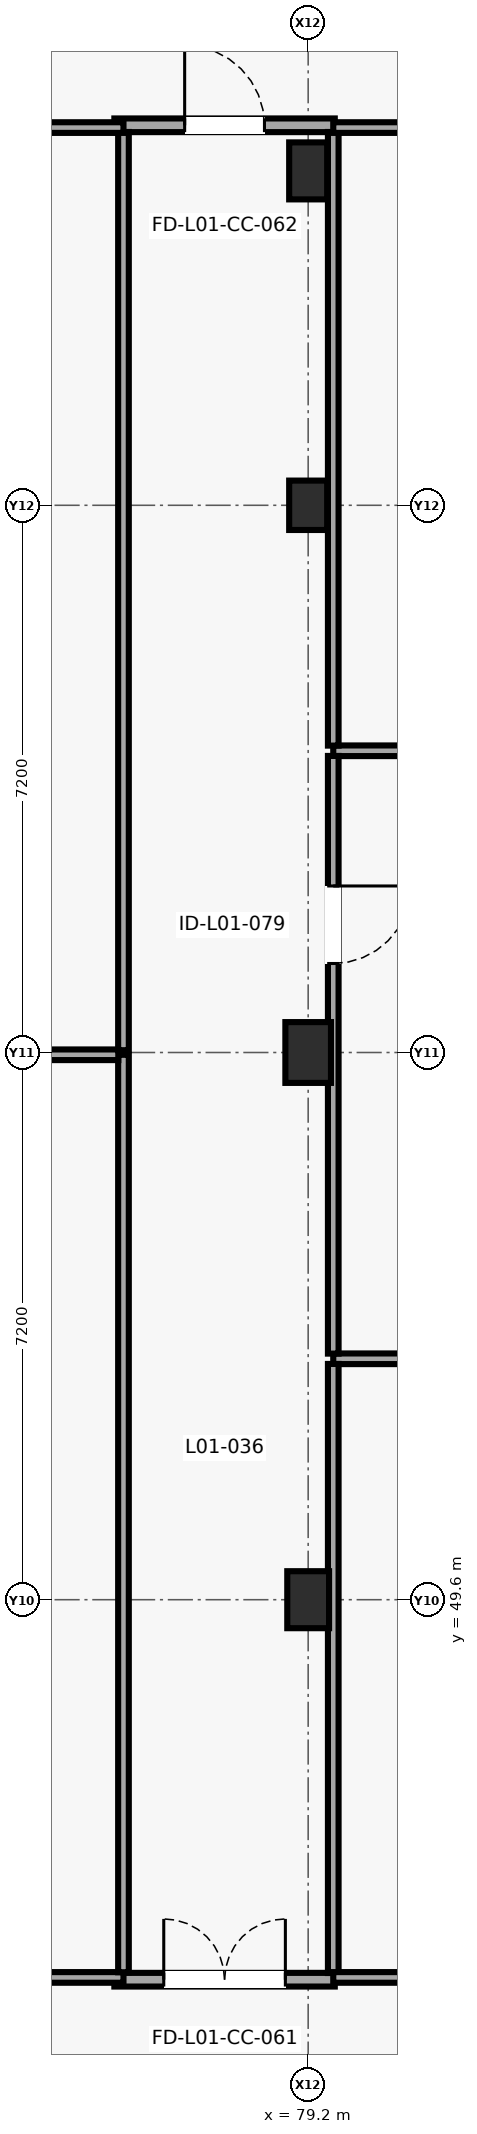
"""IFC4 building model, lengths in metres.
Left out: names, types, materials, properties, quantities, classifications, styles, units other than length and angle.
Written with IfcOpenShell. Run it as: python <this file> out.ifc"""

import sys

from ifc_helpers import new_model, si_unit, direction, frame, frame_2d, origin, origin_2d, place, context, subcontext, project, spatial, rectangle, extrude, element, fill, save


model = new_model("IFC4")
c1 = context("Model", 3, precision=1e-05, world=origin(), true_north=direction((0.0, 1.0)))
c2 = subcontext(c1, "Body", "Model", "MODEL_VIEW")
j1 = project(units=[si_unit("LENGTHUNIT", "METRE"), si_unit("PLANEANGLEUNIT", "RADIAN")], contexts=[c1])
p1 = place(None, origin())
s1 = spatial("IfcSite", under=j1, at=p1, CompositionType="ELEMENT")
p2 = place(p1, origin())
s2 = spatial("IfcBuilding", under=s1, at=p2, CompositionType="ELEMENT")
p3 = place(p2, frame((0.0, 0.0, 4.2)))
s3 = spatial("IfcBuildingStorey", under=s2, at=p3, CompositionType="ELEMENT", Elevation=4.2)
p4 = place(p3, frame((79.2, 49.6, 0.0), z_axis=(0.0, 0.0, 1.0), x_axis=(1.0, 0.0, 0.0)))
e1 = element("IfcColumn", 1, at=p4, inside=s3, PredefinedType="COLUMN", context=c2, shape_type="SweptSolid", body=[
    extrude(rectangle(XDim=0.55, YDim=0.75, at=origin_2d()), origin(), (0.0, 0.0, 1.0), 4.0),
])
p5 = place(p3, frame((79.2, 56.8, 0.0), z_axis=(0.0, 0.0, 1.0), x_axis=(1.0, 0.0, 0.0)))
e2 = element("IfcColumn", 2, at=p5, inside=s3, PredefinedType="COLUMN", context=c2, shape_type="SweptSolid", body=[
    extrude(rectangle(XDim=0.6, YDim=0.8, at=origin_2d()), origin(), (0.0, 0.0, 1.0), 4.0),
])
p6 = place(p3, frame((79.2, 64.0, 0.0), z_axis=(0.0, 0.0, 1.0), x_axis=(1.0, 0.0, 0.0)))
e3 = element("IfcColumn", 3, at=p6, inside=s3, PredefinedType="COLUMN", context=c2, shape_type="SweptSolid", body=[
    extrude(rectangle(XDim=0.5, YDim=0.65, at=origin_2d()), origin(), (0.0, 0.0, 1.0), 4.0),
])
p7 = place(p3, frame((79.2, 68.4, 0.0), z_axis=(0.0, 0.0, 1.0), x_axis=(1.0, 0.0, 0.0)))
e4 = element("IfcColumn", 4, at=p7, inside=s3, PredefinedType="COLUMN", context=c2, shape_type="SweptSolid", body=[
    extrude(rectangle(XDim=0.5, YDim=0.75, at=origin_2d()), origin(), (0.0, 0.0, 1.0), 4.0),
])
p8 = place(p3, frame((76.65, 44.6, 0.0), z_axis=(0.0, 0.0, 1.0), x_axis=(1.0, 0.0, 0.0)))
e5 = element("IfcWall", 5, at=p8, inside=s3, PredefinedType="PARTITIONING", context=c2, shape_type="SweptSolid", body=[
    extrude(rectangle(XDim=2.9, YDim=0.18, at=frame_2d((1.45, 0.0))), origin(), (0.0, 0.0, 1.0), 3.78),
])
p9 = place(p8, frame((0.65, 0.0, 0.0)))
e6 = element("IfcOpeningElement", 6, at=p9, cuts=e5, PredefinedType="OPENING", context=c2, shape_type="SweptSolid", body=[
    extrude(rectangle(XDim=1.6, YDim=2.25, at=frame_2d((0.8, 1.125))), frame((0.0, 0.1, 0.0), z_axis=(0.0, -1.0, 0.0), x_axis=(1.0, 0.0, 0.0)), (0.0, 0.0, 1.0), 0.2),
])
p10 = place(p3, frame((76.65, 69.0, 0.0), z_axis=(0.0, 0.0, 1.0), x_axis=(1.0, 0.0, 0.0)))
e7 = element("IfcWall", 7, at=p10, inside=s3, PredefinedType="PARTITIONING", context=c2, shape_type="SweptSolid", body=[
    extrude(rectangle(XDim=2.9, YDim=0.18, at=frame_2d((1.45, 0.0))), origin(), (0.0, 0.0, 1.0), 3.78),
])
p11 = place(p10, frame((0.925, 0.0, 0.0)))
e8 = element("IfcOpeningElement", 8, at=p11, cuts=e7, PredefinedType="OPENING", context=c2, shape_type="SweptSolid", body=[
    extrude(rectangle(XDim=1.05, YDim=2.15, at=frame_2d((0.525, 1.075))), frame((0.0, 0.1, 0.0), z_axis=(0.0, -1.0, 0.0), x_axis=(1.0, 0.0, 0.0)), (0.0, 0.0, 1.0), 0.2),
])
p12 = place(p3, frame((87.902, 52.77, 0.0), z_axis=(0.0, 0.0, 1.0), x_axis=(-1.0, 0.0, 0.0)))
e9 = element("IfcWall", 9, at=p12, inside=s3, PredefinedType="PARTITIONING", context=c2, shape_type="SweptSolid", body=[
    extrude(rectangle(XDim=8.372, YDim=0.14, at=frame_2d((4.186, 0.0))), origin(), (0.0, 0.0, 1.0), 3.775),
])
p13 = place(p3, frame((79.53, 52.702, 0.0), z_axis=(0.0, 0.0, 1.0), x_axis=(0.0, -1.0, 0.0)))
e10 = element("IfcWall", 10, at=p13, inside=s3, PredefinedType="PARTITIONING", context=c2, shape_type="SweptSolid", body=[
    extrude(rectangle(XDim=8.014, YDim=0.14, at=frame_2d((4.007, 0.0))), origin(), (0.0, 0.0, 1.0), 3.775),
])
p14 = place(p3, frame((79.53, 44.63, 0.0), z_axis=(0.0, 0.0, 1.0), x_axis=(1.0, 0.0, 0.0)))
e11 = element("IfcWall", 11, at=p14, inside=s3, PredefinedType="PARTITIONING", context=c2, shape_type="SweptSolid", body=[
    extrude(rectangle(XDim=8.372, YDim=0.14, at=frame_2d((4.186, 0.0))), origin(), (0.0, 0.0, 1.0), 3.775),
])
p15 = place(p14, frame((3.561, 0.0, 0.0)))
e12 = element("IfcOpeningElement", 12, at=p15, cuts=e11, PredefinedType="OPENING", context=c2, shape_type="SweptSolid", body=[
    extrude(rectangle(XDim=1.25, YDim=2.22, at=frame_2d((0.625, 1.11))), frame((0.0, 0.08, 0.0), z_axis=(0.0, -1.0, 0.0), x_axis=(1.0, 0.0, 0.0)), (0.0, 0.0, 1.0), 0.16),
])
p16 = place(p14, frame((5.511, 0.0, 1.05)))
e13 = element("IfcOpeningElement", 13, at=p16, cuts=e11, PredefinedType="OPENING", context=c2, shape_type="SweptSolid", body=[
    extrude(rectangle(XDim=1.8, YDim=1.2, at=frame_2d((0.9, 0.6))), frame((0.0, 0.08, 0.0), z_axis=(0.0, -1.0, 0.0), x_axis=(1.0, 0.0, 0.0)), (0.0, 0.0, 1.0), 0.16),
])
p17 = place(p3, frame((87.902, 60.77, 0.0), z_axis=(0.0, 0.0, 1.0), x_axis=(-1.0, 0.0, 0.0)))
e14 = element("IfcWall", 14, at=p17, inside=s3, PredefinedType="PARTITIONING", context=c2, shape_type="SweptSolid", body=[
    extrude(rectangle(XDim=8.372, YDim=0.14, at=frame_2d((4.186, 0.0))), origin(), (0.0, 0.0, 1.0), 3.775),
])
p18 = place(p3, frame((79.53, 60.702, 0.0), z_axis=(0.0, 0.0, 1.0), x_axis=(0.0, -1.0, 0.0)))
e15 = element("IfcWall", 15, at=p18, inside=s3, PredefinedType="PARTITIONING", context=c2, shape_type="SweptSolid", body=[
    extrude(rectangle(XDim=7.864, YDim=0.14, at=frame_2d((3.932, 0.0))), origin(), (0.0, 0.0, 1.0), 3.775),
])
p19 = place(p18, frame((1.711, 0.0, 0.0)))
e16 = element("IfcOpeningElement", 16, at=p19, cuts=e15, PredefinedType="OPENING", context=c2, shape_type="SweptSolid", body=[
    extrude(rectangle(XDim=1.02, YDim=2.14, at=frame_2d((0.51, 1.07))), frame((0.0, 0.08, 0.0), z_axis=(0.0, -1.0, 0.0), x_axis=(1.0, 0.0, 0.0)), (0.0, 0.0, 1.0), 0.16),
])
p20 = place(p3, frame((79.53, 68.912, 0.0), z_axis=(0.0, 0.0, 1.0), x_axis=(0.0, -1.0, 0.0)))
e17 = element("IfcWall", 17, at=p20, inside=s3, PredefinedType="PARTITIONING", context=c2, shape_type="SweptSolid", body=[
    extrude(rectangle(XDim=8.074, YDim=0.14, at=frame_2d((4.037, 0.0))), origin(), (0.0, 0.0, 1.0), 3.775),
])
p21 = place(p3, frame((87.902, 68.97, 0.0), z_axis=(0.0, 0.0, 1.0), x_axis=(-1.0, 0.0, 0.0)))
e18 = element("IfcWall", 18, at=p21, inside=s3, PredefinedType="PARTITIONING", context=c2, shape_type="SweptSolid", body=[
    extrude(rectangle(XDim=8.372, YDim=0.14, at=frame_2d((4.186, 0.0))), origin(), (0.0, 0.0, 1.0), 3.775),
])
p22 = place(p21, frame((3.646, 0.0, 0.0)))
e19 = element("IfcOpeningElement", 19, at=p22, cuts=e18, PredefinedType="OPENING", context=c2, shape_type="SweptSolid", body=[
    extrude(rectangle(XDim=1.08, YDim=2.16, at=frame_2d((0.54, 1.08))), frame((0.0, 0.08, 0.0), z_axis=(0.0, -1.0, 0.0), x_axis=(1.0, 0.0, 0.0)), (0.0, 0.0, 1.0), 0.16),
])
p23 = place(p21, frame((5.426, 0.0, 1.05)))
e20 = element("IfcOpeningElement", 20, at=p23, cuts=e18, PredefinedType="OPENING", context=c2, shape_type="SweptSolid", body=[
    extrude(rectangle(XDim=1.6, YDim=1.1, at=frame_2d((0.8, 0.55))), frame((0.0, 0.08, 0.0), z_axis=(0.0, -1.0, 0.0), x_axis=(1.0, 0.0, 0.0)), (0.0, 0.0, 1.0), 0.16),
])
p24 = place(p3, frame((63.43, 44.63, 0.0), z_axis=(0.0, 0.0, 1.0), x_axis=(1.0, 0.0, 0.0)))
e21 = element("IfcWall", 21, at=p24, inside=s3, PredefinedType="PARTITIONING", context=c2, shape_type="SweptSolid", body=[
    extrude(rectangle(XDim=13.34, YDim=0.14, at=frame_2d((6.67, 0.0))), origin(), (0.0, 0.0, 1.0), 3.775),
])
p25 = place(p24, frame((6.16, 0.0, 0.0)))
e22 = element("IfcOpeningElement", 22, at=p25, cuts=e21, PredefinedType="OPENING", context=c2, shape_type="SweptSolid", body=[
    extrude(rectangle(XDim=1.02, YDim=2.14, at=frame_2d((0.51, 1.07))), frame((0.0, 0.08, 0.0), z_axis=(0.0, -1.0, 0.0), x_axis=(1.0, 0.0, 0.0)), (0.0, 0.0, 1.0), 0.16),
])
p26 = place(p24, frame((7.88, 0.0, 1.05)))
e23 = element("IfcOpeningElement", 23, at=p26, cuts=e21, PredefinedType="OPENING", context=c2, shape_type="SweptSolid", body=[
    extrude(rectangle(XDim=1.6, YDim=1.1, at=frame_2d((0.8, 0.55))), frame((0.0, 0.08, 0.0), z_axis=(0.0, -1.0, 0.0), x_axis=(1.0, 0.0, 0.0)), (0.0, 0.0, 1.0), 0.16),
])
p27 = place(p3, frame((76.77, 44.698, 0.0), z_axis=(0.0, 0.0, 1.0), x_axis=(0.0, 1.0, 0.0)))
e24 = element("IfcWall", 24, at=p27, inside=s3, PredefinedType="PARTITIONING", context=c2, shape_type="SweptSolid", body=[
    extrude(rectangle(XDim=12.072, YDim=0.14, at=frame_2d((6.036, 0.0))), origin(), (0.0, 0.0, 1.0), 3.775),
])
p28 = place(p3, frame((76.702, 56.77, 0.0), z_axis=(0.0, 0.0, 1.0), x_axis=(-1.0, 0.0, 0.0)))
e25 = element("IfcWall", 25, at=p28, inside=s3, PredefinedType="PARTITIONING", context=c2, shape_type="SweptSolid", body=[
    extrude(rectangle(XDim=2.086, YDim=0.14, at=frame_2d((1.043, 0.0))), origin(), (0.0, 0.0, 1.0), 3.775),
])
p29 = place(p3, frame((76.77, 56.83, 0.0), z_axis=(0.0, 0.0, 1.0), x_axis=(0.0, 1.0, 0.0)))
e26 = element("IfcWall", 26, at=p29, inside=s3, PredefinedType="PARTITIONING", context=c2, shape_type="SweptSolid", body=[
    extrude(rectangle(XDim=12.082, YDim=0.14, at=frame_2d((6.041, 0.0))), origin(), (0.0, 0.0, 1.0), 3.775),
])
p30 = place(p3, frame((76.77, 68.97, 0.0), z_axis=(0.0, 0.0, 1.0), x_axis=(-1.0, 0.0, 0.0)))
e27 = element("IfcWall", 27, at=p30, inside=s3, PredefinedType="PARTITIONING", context=c2, shape_type="SweptSolid", body=[
    extrude(rectangle(XDim=13.34, YDim=0.14, at=frame_2d((6.67, 0.0))), origin(), (0.0, 0.0, 1.0), 3.775),
])
p31 = place(p30, frame((6.13, 0.0, 0.0)))
e28 = element("IfcOpeningElement", 28, at=p31, cuts=e27, PredefinedType="OPENING", context=c2, shape_type="SweptSolid", body=[
    extrude(rectangle(XDim=1.08, YDim=2.16, at=frame_2d((0.54, 1.08))), frame((0.0, 0.08, 0.0), z_axis=(0.0, -1.0, 0.0), x_axis=(1.0, 0.0, 0.0)), (0.0, 0.0, 1.0), 0.16),
])
p32 = place(p30, frame((7.91, 0.0, 1.05)))
e29 = element("IfcOpeningElement", 29, at=p32, cuts=e27, PredefinedType="OPENING", context=c2, shape_type="SweptSolid", body=[
    extrude(rectangle(XDim=1.8, YDim=1.2, at=frame_2d((0.9, 0.6))), frame((0.0, 0.08, 0.0), z_axis=(0.0, -1.0, 0.0), x_axis=(1.0, 0.0, 0.0)), (0.0, 0.0, 1.0), 0.16),
])
p33 = place(p9, origin())
e30 = element("IfcDoor", 30, at=p33, inside=s3, OperationType="DOUBLE_DOOR_SINGLE_SWING", PredefinedType="DOOR", context=c2, shape_type="SweptSolid", body=[
    extrude(rectangle(XDim=1.6, YDim=2.25, at=frame_2d((0.8, 1.125))), frame((0.0, 0.025, 0.0), z_axis=(0.0, -1.0, 0.0), x_axis=(1.0, 0.0, 0.0)), (0.0, 0.0, 1.0), 0.05),
])
fill(e6, e30)
p34 = place(p11, origin())
e31 = element("IfcDoor", 31, at=p34, inside=s3, OperationType="SINGLE_SWING_LEFT", PredefinedType="DOOR", context=c2, shape_type="SweptSolid", body=[
    extrude(rectangle(XDim=1.05, YDim=2.15, at=frame_2d((0.525, 1.075))), frame((0.0, 0.025, 0.0), z_axis=(0.0, -1.0, 0.0), x_axis=(1.0, 0.0, 0.0)), (0.0, 0.0, 1.0), 0.05),
])
fill(e8, e31)
p35 = place(p19, origin())
e32 = element("IfcDoor", 32, at=p35, inside=s3, OperationType="SINGLE_SWING_LEFT", PredefinedType="DOOR", context=c2, shape_type="SweptSolid", body=[
    extrude(rectangle(XDim=1.02, YDim=2.14, at=frame_2d((0.51, 1.07))), frame((0.0, 0.025, 0.0), z_axis=(0.0, -1.0, 0.0), x_axis=(1.0, 0.0, 0.0)), (0.0, 0.0, 1.0), 0.05),
])
fill(e16, e32)
save(model, sys.argv[1])
